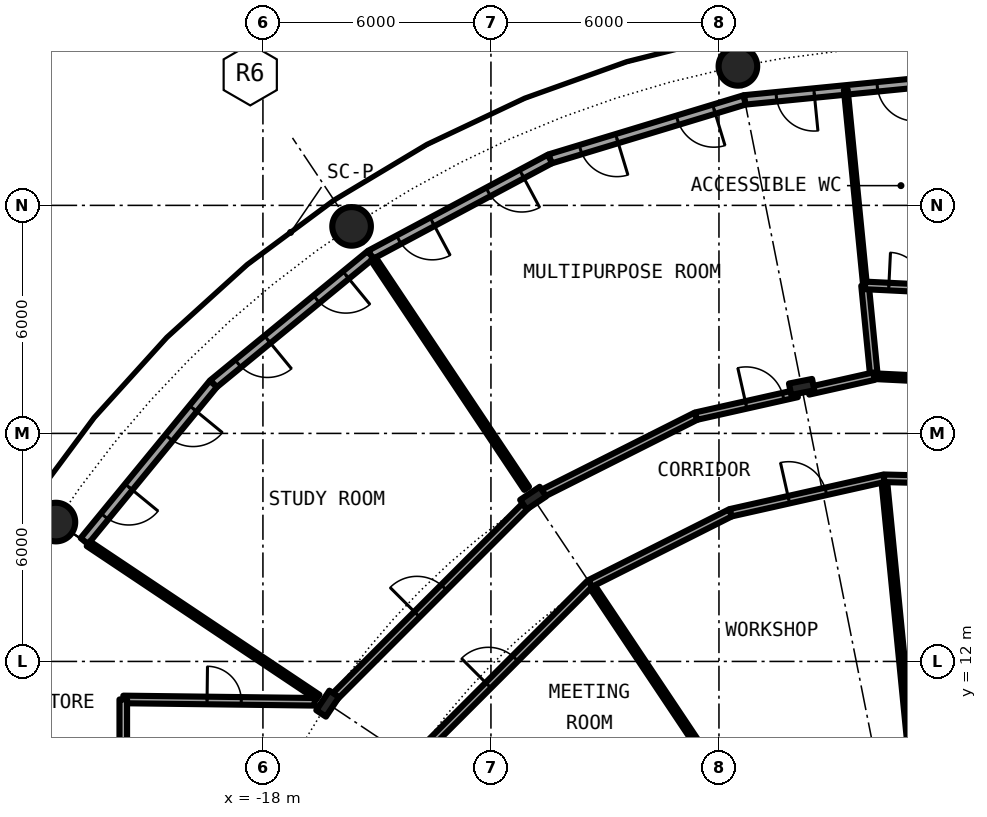
"""IFC4 building model, lengths in metres.
Left out: names, types, materials, properties, quantities, classifications, styles, units other than length and angle.
Written with IfcOpenShell. Run it as: python <this file> out.ifc"""

import sys

from ifc_helpers import new_model, si_unit, direction, frame, frame_2d, origin, origin_2d, place, context, subcontext, project, spatial, rectangle, hollow_circle, i_section, extrude, element, fill, save


model = new_model("IFC4")
c1 = context("Model", 3, precision=1e-05, world=origin(), true_north=direction((0.0, 1.0)))
c2 = subcontext(c1, "Body", "Model", "MODEL_VIEW")
j1 = project(units=[si_unit("LENGTHUNIT", "METRE"), si_unit("PLANEANGLEUNIT", "RADIAN")], contexts=[c1])
p1 = place(None, origin())
s1 = spatial("IfcSite", under=j1, at=p1, CompositionType="ELEMENT")
p2 = place(p1, origin())
s2 = spatial("IfcBuilding", under=s1, at=p2, CompositionType="ELEMENT")
p3 = place(p2, frame((0.0, 0.0, 53.3)))
s3 = spatial("IfcBuildingStorey", under=s2, at=p3, CompositionType="ELEMENT", Elevation=53.3)
for number, where, z_axis, x_axis in (
    (1, (-5.501, 27.658, 0.0), (0.0, 0.0, 1.0), (1.0, 0.0, 0.0)),
    (2, (-15.667, 23.448, 0.0), (0.0, 0.0, 1.0), (1.0, 0.0, 0.0)),
    (3, (-23.448, 15.667, 0.0), (0.0, 0.0, 1.0), (1.0, 0.0, 0.0)),
):
    element("IfcColumn", number, at=place(p3, frame(where, z_axis=z_axis, x_axis=x_axis)), inside=s3, PredefinedType="COLUMN", context=c2, shape_type="SweptSolid", body=[
        extrude(hollow_circle(Radius=0.508, WallThickness=0.05, at=origin_2d()), origin(), (0.0, 0.0, 1.0), 4.2),
    ])
for number, where, z_axis, x_axis in (
    (4, (-3.824, 19.223, 0.0), (0.0, 0.0, 1.0), (-0.195, 0.981, 0.0)),
    (5, (-10.889, 16.297, 0.0), (0.0, 0.0, 1.0), (-0.556, 0.831, 0.0)),
    (6, (-16.297, 10.889, 0.0), (0.0, 0.0, 1.0), (-0.831, 0.556, 0.0)),
):
    element("IfcColumn", number, at=place(p3, frame(where, z_axis=z_axis, x_axis=x_axis)), inside=s3, PredefinedType="COLUMN", context=c2, shape_type="SweptSolid", body=[
        extrude(i_section(OverallWidth=0.305, OverallDepth=0.62, WebThickness=0.021, FlangeThickness=0.04, FilletRadius=0.027, at=origin_2d()), origin(), (0.0, 0.0, 1.0), 4.2),
    ])
p4 = place(p3, frame((0.0, 27.3, 0.0), z_axis=(0.0, 0.0, 1.0), x_axis=(-0.995173996315, -0.098126026407, 0.0)))
e7 = element("IfcWall", 7, at=p4, inside=s3, PredefinedType="SOLIDWALL", context=c2, shape_type="SweptSolid", body=[
    extrude(rectangle(XDim=5.352, YDim=0.25, at=frame_2d((2.676, 0.0))), origin(), (0.0, 0.0, 1.0), 3.8),
])
p5 = place(p4, frame((0.841, 0.0, 0.0)))
e8 = element("IfcOpeningElement", 8, at=p5, cuts=e7, PredefinedType="OPENING", context=c2, shape_type="SweptSolid", body=[
    extrude(rectangle(XDim=1.0, YDim=2.2, at=frame_2d((0.5, 1.1))), frame((0.0, 0.135, 0.0), z_axis=(0.0, -1.0, 0.0), x_axis=(1.0, 0.0, 0.0)), (0.0, 0.0, 1.0), 0.27),
])
p6 = place(p4, frame((3.51, 0.0, 0.0)))
e9 = element("IfcOpeningElement", 9, at=p6, cuts=e7, PredefinedType="OPENING", context=c2, shape_type="SweptSolid", body=[
    extrude(rectangle(XDim=1.0, YDim=2.2, at=frame_2d((0.5, 1.1))), frame((0.0, 0.135, 0.0), z_axis=(0.0, -1.0, 0.0), x_axis=(1.0, 0.0, 0.0)), (0.0, 0.0, 1.0), 0.27),
])
p7 = place(p3, frame((-5.326, 26.775, 0.0), z_axis=(0.0, 0.0, 1.0), x_axis=(-0.956965678721, -0.290201119486, 0.0)))
e10 = element("IfcWall", 10, at=p7, inside=s3, PredefinedType="SOLIDWALL", context=c2, shape_type="SweptSolid", body=[
    extrude(rectangle(XDim=5.351, YDim=0.25, at=frame_2d((2.676, 0.0))), origin(), (0.0, 0.0, 1.0), 3.8),
])
p8 = place(p7, frame((0.841, 0.0, 0.0)))
e11 = element("IfcOpeningElement", 11, at=p8, cuts=e10, PredefinedType="OPENING", context=c2, shape_type="SweptSolid", body=[
    extrude(rectangle(XDim=1.0, YDim=2.2, at=frame_2d((0.5, 1.1))), frame((0.0, 0.135, 0.0), z_axis=(0.0, -1.0, 0.0), x_axis=(1.0, 0.0, 0.0)), (0.0, 0.0, 1.0), 0.27),
])
p9 = place(p7, frame((3.51, 0.0, 0.0)))
e12 = element("IfcOpeningElement", 12, at=p9, cuts=e10, PredefinedType="OPENING", context=c2, shape_type="SweptSolid", body=[
    extrude(rectangle(XDim=1.0, YDim=2.2, at=frame_2d((0.5, 1.1))), frame((0.0, 0.135, 0.0), z_axis=(0.0, -1.0, 0.0), x_axis=(1.0, 0.0, 0.0)), (0.0, 0.0, 1.0), 0.27),
])
p10 = place(p3, frame((-10.447, 25.222, 0.0), z_axis=(0.0, 0.0, 1.0), x_axis=(-0.881915646801, -0.471407246368, 0.0)))
e13 = element("IfcWall", 13, at=p10, inside=s3, PredefinedType="SOLIDWALL", context=c2, shape_type="SweptSolid", body=[
    extrude(rectangle(XDim=5.352, YDim=0.25, at=frame_2d((2.676, 0.0))), origin(), (0.0, 0.0, 1.0), 3.8),
])
p11 = place(p10, frame((0.841, 0.0, 0.0)))
e14 = element("IfcOpeningElement", 14, at=p11, cuts=e13, PredefinedType="OPENING", context=c2, shape_type="SweptSolid", body=[
    extrude(rectangle(XDim=1.0, YDim=2.2, at=frame_2d((0.5, 1.1))), frame((0.0, 0.135, 0.0), z_axis=(0.0, -1.0, 0.0), x_axis=(1.0, 0.0, 0.0)), (0.0, 0.0, 1.0), 0.27),
])
p12 = place(p10, frame((3.51, 0.0, 0.0)))
e15 = element("IfcOpeningElement", 15, at=p12, cuts=e13, PredefinedType="OPENING", context=c2, shape_type="SweptSolid", body=[
    extrude(rectangle(XDim=1.0, YDim=2.2, at=frame_2d((0.5, 1.1))), frame((0.0, 0.135, 0.0), z_axis=(0.0, -1.0, 0.0), x_axis=(1.0, 0.0, 0.0)), (0.0, 0.0, 1.0), 0.27),
])
p13 = place(p3, frame((-15.167, 22.699, 0.0), z_axis=(0.0, 0.0, 1.0), x_axis=(-0.773019449054, -0.634382322723, 0.0)))
e16 = element("IfcWall", 16, at=p13, inside=s3, PredefinedType="SOLIDWALL", context=c2, shape_type="SweptSolid", body=[
    extrude(rectangle(XDim=5.352, YDim=0.25, at=frame_2d((2.676, 0.0))), origin(), (0.0, 0.0, 1.0), 3.8),
])
p14 = place(p13, frame((0.841, 0.0, 0.0)))
e17 = element("IfcOpeningElement", 17, at=p14, cuts=e16, PredefinedType="OPENING", context=c2, shape_type="SweptSolid", body=[
    extrude(rectangle(XDim=1.0, YDim=2.2, at=frame_2d((0.5, 1.1))), frame((0.0, 0.135, 0.0), z_axis=(0.0, -1.0, 0.0), x_axis=(1.0, 0.0, 0.0)), (0.0, 0.0, 1.0), 0.27),
])
p15 = place(p13, frame((3.51, 0.0, 0.0)))
e18 = element("IfcOpeningElement", 18, at=p15, cuts=e16, PredefinedType="OPENING", context=c2, shape_type="SweptSolid", body=[
    extrude(rectangle(XDim=1.0, YDim=2.2, at=frame_2d((0.5, 1.1))), frame((0.0, 0.135, 0.0), z_axis=(0.0, -1.0, 0.0), x_axis=(1.0, 0.0, 0.0)), (0.0, 0.0, 1.0), 0.27),
])
p16 = place(p3, frame((-19.304, 19.304, 0.0), z_axis=(0.0, 0.0, 1.0), x_axis=(-0.634382322723, -0.773019449054, 0.0)))
e19 = element("IfcWall", 19, at=p16, inside=s3, PredefinedType="SOLIDWALL", context=c2, shape_type="SweptSolid", body=[
    extrude(rectangle(XDim=5.352, YDim=0.25, at=frame_2d((2.676, 0.0))), origin(), (0.0, 0.0, 1.0), 3.8),
])
p17 = place(p16, frame((0.841, 0.0, 0.0)))
e20 = element("IfcOpeningElement", 20, at=p17, cuts=e19, PredefinedType="OPENING", context=c2, shape_type="SweptSolid", body=[
    extrude(rectangle(XDim=1.0, YDim=2.2, at=frame_2d((0.5, 1.1))), frame((0.0, 0.135, 0.0), z_axis=(0.0, -1.0, 0.0), x_axis=(1.0, 0.0, 0.0)), (0.0, 0.0, 1.0), 0.27),
])
p18 = place(p16, frame((3.51, 0.0, 0.0)))
e21 = element("IfcOpeningElement", 21, at=p18, cuts=e19, PredefinedType="OPENING", context=c2, shape_type="SweptSolid", body=[
    extrude(rectangle(XDim=1.0, YDim=2.2, at=frame_2d((0.5, 1.1))), frame((0.0, 0.135, 0.0), z_axis=(0.0, -1.0, 0.0), x_axis=(1.0, 0.0, 0.0)), (0.0, 0.0, 1.0), 0.27),
])
p19 = place(p3, frame((-22.595, 15.098, 0.0), z_axis=(0.0, 0.0, 1.0), x_axis=(0.831403467378, -0.55566921314, 0.0)))
e22 = element("IfcWall", 22, at=p19, inside=s3, PredefinedType="PARTITIONING", context=c2, shape_type="SweptSolid", body=[
    extrude(rectangle(XDim=7.265, YDim=0.15, at=frame_2d((3.632, 0.0))), origin(), (0.0, 0.0, 1.0), 3.8),
])
p20 = place(p3, frame((-15.097, 22.595, 0.0), z_axis=(0.0, 0.0, 1.0), x_axis=(0.555576285599, -0.831465568067, 0.0)))
e23 = element("IfcWall", 23, at=p20, inside=s3, PredefinedType="PARTITIONING", context=c2, shape_type="SweptSolid", body=[
    extrude(rectangle(XDim=7.264, YDim=0.15, at=frame_2d((3.632, 0.0))), origin(), (0.0, 0.0, 1.0), 3.8),
])
p21 = place(p3, frame((-9.389, 14.052, 0.0), z_axis=(0.0, 0.0, 1.0), x_axis=(0.555540720778, -0.831489330994, 0.0)))
e24 = element("IfcWall", 24, at=p21, inside=s3, PredefinedType="PARTITIONING", context=c2, shape_type="SweptSolid", body=[
    extrude(rectangle(XDim=9.18, YDim=0.15, at=frame_2d((4.59, 0.0))), origin(), (0.0, 0.0, 1.0), 3.8),
])
p22 = place(p3, frame((-2.663, 27.044, 0.0), z_axis=(0.0, 0.0, 1.0), x_axis=(0.097990148768, -0.995187384739, 0.0)))
e25 = element("IfcWall", 25, at=p22, inside=s3, PredefinedType="PARTITIONING", context=c2, shape_type="SweptSolid", body=[
    extrude(rectangle(XDim=5.175, YDim=0.1, at=frame_2d((2.587, 0.0))), origin(), (0.0, 0.0, 1.0), 3.8),
])
p23 = place(p3, frame((-2.156, 21.894, 0.0), z_axis=(0.0, 0.0, 1.0), x_axis=(0.097982433599, -0.995188144376, 0.0)))
e26 = element("IfcWall", 26, at=p23, inside=s3, PredefinedType="PARTITIONING", context=c2, shape_type="SweptSolid", body=[
    extrude(rectangle(XDim=2.399, YDim=0.2, at=frame_2d((1.2, 0.0))), origin(), (0.0, 0.0, 1.0), 3.8),
])
p24 = place(p3, frame((-1.657, 16.819, 0.0), z_axis=(0.0, 0.0, 1.0), x_axis=(0.097921086551, -0.995194182463, 0.0)))
e27 = element("IfcWall", 27, at=p24, inside=s3, PredefinedType="PARTITIONING", context=c2, shape_type="SweptSolid", body=[
    extrude(rectangle(XDim=9.18, YDim=0.15, at=frame_2d((4.59, 0.0))), origin(), (0.0, 0.0, 1.0), 3.8),
])
p25 = place(p3, frame((-21.675, 11.0, 0.0), z_axis=(0.0, 0.0, 1.0), x_axis=(0.99992425795, -0.012307654658, 0.0)))
e28 = element("IfcWall", 28, at=p25, inside=s3, PredefinedType="PARTITIONING", context=c2, shape_type="SweptSolid", body=[
    extrude(rectangle(XDim=5.039, YDim=0.2, at=frame_2d((2.519, 0.0))), origin(), (0.0, 0.0, 1.0), 3.8),
])
p26 = place(p25, frame((2.205, 0.0, 0.0)))
e29 = element("IfcOpeningElement", 29, at=p26, cuts=e28, PredefinedType="OPENING", context=c2, shape_type="SweptSolid", body=[
    extrude(rectangle(XDim=0.9, YDim=2.3, at=frame_2d((0.45, 1.15))), frame((0.0, 0.11, 0.0), z_axis=(0.0, -1.0, 0.0), x_axis=(1.0, 0.0, 0.0)), (0.0, 0.0, 1.0), 0.22),
])
p27 = place(p3, frame((-14.041, 9.4, 0.0), z_axis=(0.0, 0.0, 1.0), x_axis=(0.707106781187, 0.707106781187, 0.0)))
e30 = element("IfcWall", 30, at=p27, inside=s3, PredefinedType="PARTITIONING", context=c2, shape_type="SweptSolid", body=[
    extrude(rectangle(XDim=6.579, YDim=0.2, at=frame_2d((3.29, 0.0))), origin(), (0.0, 0.0, 1.0), 3.8),
])
p28 = place(p27, frame((2.789, 0.0, 0.0)))
e31 = element("IfcOpeningElement", 31, at=p28, cuts=e30, PredefinedType="OPENING", context=c2, shape_type="SweptSolid", body=[
    extrude(rectangle(XDim=1.0, YDim=2.3, at=frame_2d((0.5, 1.15))), frame((0.0, 0.11, 0.0), z_axis=(0.0, -1.0, 0.0), x_axis=(1.0, 0.0, 0.0)), (0.0, 0.0, 1.0), 0.22),
])
p29 = place(p3, frame((-9.389, 14.052, 0.0), z_axis=(0.0, 0.0, 1.0), x_axis=(0.893243942099, 0.449572307759, 0.0)))
e32 = element("IfcWall", 32, at=p29, inside=s3, PredefinedType="PARTITIONING", context=c2, shape_type="SweptSolid", body=[
    extrude(rectangle(XDim=4.137, YDim=0.2, at=frame_2d((2.069, 0.0))), origin(), (0.0, 0.0, 1.0), 3.8),
])
p30 = place(p3, frame((-5.693, 15.912, 0.0), z_axis=(0.0, 0.0, 1.0), x_axis=(0.975680467384, 0.219197686039, 0.0)))
e33 = element("IfcWall", 33, at=p30, inside=s3, PredefinedType="PARTITIONING", context=c2, shape_type="SweptSolid", body=[
    extrude(rectangle(XDim=4.138, YDim=0.2, at=frame_2d((2.069, 0.0))), origin(), (0.0, 0.0, 1.0), 3.8),
])
p31 = place(p30, frame((1.569, 0.0, 0.0)))
e34 = element("IfcOpeningElement", 34, at=p31, cuts=e33, PredefinedType="OPENING", context=c2, shape_type="SweptSolid", body=[
    extrude(rectangle(XDim=1.0, YDim=2.3, at=frame_2d((0.5, 1.15))), frame((0.0, 0.11, 0.0), z_axis=(0.0, -1.0, 0.0), x_axis=(1.0, 0.0, 0.0)), (0.0, 0.0, 1.0), 0.22),
])
p32 = place(p3, frame((-1.656, 16.819, 0.0), z_axis=(0.0, 0.0, 1.0), x_axis=(0.999695739034, -0.024666360836, 0.0)))
e35 = element("IfcWall", 35, at=p32, inside=s3, PredefinedType="PARTITIONING", context=c2, shape_type="SweptSolid", body=[
    extrude(rectangle(XDim=4.137, YDim=0.2, at=frame_2d((2.069, 0.0))), origin(), (0.0, 0.0, 1.0), 3.8),
])
p33 = place(p32, frame((1.569, 0.0, 0.0)))
e36 = element("IfcOpeningElement", 36, at=p33, cuts=e35, PredefinedType="OPENING", context=c2, shape_type="SweptSolid", body=[
    extrude(rectangle(XDim=1.0, YDim=2.3, at=frame_2d((0.5, 1.15))), frame((0.0, 0.11, 0.0), z_axis=(0.0, -1.0, 0.0), x_axis=(1.0, 0.0, 0.0)), (0.0, 0.0, 1.0), 0.22),
])
p34 = place(p3, frame((-16.187, 10.999, 0.0), z_axis=(0.0, 0.0, 1.0), x_axis=(0.707106781187, 0.707106781187, 0.0)))
e37 = element("IfcWall", 37, at=p34, inside=s3, PredefinedType="PARTITIONING", context=c2, shape_type="SweptSolid", body=[
    extrude(rectangle(XDim=7.337, YDim=0.2, at=frame_2d((3.668, 0.0))), origin(), (0.0, 0.0, 1.0), 3.48),
])
p35 = place(p34, frame((3.168, 0.0, 0.0)))
e38 = element("IfcOpeningElement", 38, at=p35, cuts=e37, PredefinedType="OPENING", context=c2, shape_type="SweptSolid", body=[
    extrude(rectangle(XDim=1.0, YDim=2.3, at=frame_2d((0.5, 1.15))), frame((0.0, 0.11, 0.0), z_axis=(0.0, -1.0, 0.0), x_axis=(1.0, 0.0, 0.0)), (0.0, 0.0, 1.0), 0.22),
])
p36 = place(p3, frame((-1.921, 19.506, 0.0), z_axis=(0.0, 0.0, 1.0), x_axis=(0.99879118777, -0.049154483346, 0.0)))
e39 = element("IfcWall", 39, at=p36, inside=s3, PredefinedType="PARTITIONING", context=c2, shape_type="SweptSolid", body=[
    extrude(rectangle(XDim=5.598, YDim=0.15, at=frame_2d((2.799, 0.0))), origin(), (0.0, 0.0, 1.0), 3.48),
])
p37 = place(p36, frame((2.376, 0.0, 0.0)))
e40 = element("IfcOpeningElement", 40, at=p37, cuts=e39, PredefinedType="OPENING", context=c2, shape_type="SweptSolid", body=[
    extrude(rectangle(XDim=1.0, YDim=2.3, at=frame_2d((0.5, 1.15))), frame((0.0, 0.085, 0.0), z_axis=(0.0, -1.0, 0.0), x_axis=(1.0, 0.0, 0.0)), (0.0, 0.0, 1.0), 0.17),
])
p38 = place(p3, frame((-10.752, 16.366, 0.0), z_axis=(0.0, 0.0, 1.0), x_axis=(0.893246691773, 0.449566844459, 0.0)))
e41 = element("IfcWall", 41, at=p38, inside=s3, PredefinedType="PARTITIONING", context=c2, shape_type="SweptSolid", body=[
    extrude(rectangle(XDim=4.645, YDim=0.2, at=frame_2d((2.322, 0.0))), origin(), (0.0, 0.0, 1.0), 3.48),
])
p39 = place(p3, frame((-6.603, 18.454, 0.0), z_axis=(0.0, 0.0, 1.0), x_axis=(0.975697485794, 0.219121920893, 0.0)))
e42 = element("IfcWall", 42, at=p39, inside=s3, PredefinedType="PARTITIONING", context=c2, shape_type="SweptSolid", body=[
    extrude(rectangle(XDim=2.724, YDim=0.2, at=frame_2d((1.362, 0.0))), origin(), (0.0, 0.0, 1.0), 3.48),
])
p40 = place(p39, frame((1.35, 0.0, 0.0)))
e43 = element("IfcOpeningElement", 43, at=p40, cuts=e42, PredefinedType="OPENING", context=c2, shape_type="SweptSolid", body=[
    extrude(rectangle(XDim=1.0, YDim=2.3, at=frame_2d((0.5, 1.15))), frame((0.0, 0.11, 0.0), z_axis=(0.0, -1.0, 0.0), x_axis=(1.0, 0.0, 0.0)), (0.0, 0.0, 1.0), 0.22),
])
p41 = place(p3, frame((-3.647, 19.118, 0.0), z_axis=(0.0, 0.0, 1.0), x_axis=(0.975631915864, 0.219413684049, 0.0)))
e44 = element("IfcWall", 44, at=p41, inside=s3, PredefinedType="PARTITIONING", context=c2, shape_type="SweptSolid", body=[
    extrude(rectangle(XDim=1.769, YDim=0.2, at=frame_2d((0.885, 0.0))), origin(), (0.0, 0.0, 1.0), 3.48),
])
p42 = place(p3, frame((-21.675, 9.4, 0.0), z_axis=(0.0, 0.0, 1.0), x_axis=(0.0, 1.0, 0.0)))
e45 = element("IfcWall", 45, at=p42, inside=s3, PredefinedType="PARTITIONING", context=c2, shape_type="SweptSolid", body=[
    extrude(rectangle(XDim=1.6, YDim=0.2, at=frame_2d((0.8, 0.0))), origin(), (0.0, 0.0, 1.0), 3.8),
])
p43 = place(p3, frame((-2.156, 21.894, 0.0), z_axis=(0.0, 0.0, 1.0), x_axis=(0.998785221138, -0.049275572418, 0.0)))
e46 = element("IfcWall", 46, at=p43, inside=s3, PredefinedType="PARTITIONING", context=c2, shape_type="SweptSolid", body=[
    extrude(rectangle(XDim=6.456, YDim=0.2, at=frame_2d((3.228, 0.0))), origin(), (0.0, 0.0, 1.0), 3.8),
])
p44 = place(p43, frame((4.93, 0.0, 0.0)))
e47 = element("IfcOpeningElement", 47, at=p44, cuts=e46, PredefinedType="OPENING", context=c2, shape_type="SweptSolid", body=[
    extrude(rectangle(XDim=0.9, YDim=2.3, at=frame_2d((0.45, 1.15))), frame((0.0, 0.11, 0.0), z_axis=(0.0, -1.0, 0.0), x_axis=(1.0, 0.0, 0.0)), (0.0, 0.0, 1.0), 0.22),
])
p45 = place(p43, frame((2.788, 0.0, 0.0)))
e48 = element("IfcOpeningElement", 48, at=p45, cuts=e46, PredefinedType="OPENING", context=c2, shape_type="SweptSolid", body=[
    extrude(rectangle(XDim=0.9, YDim=2.3, at=frame_2d((0.45, 1.15))), frame((0.0, 0.11, 0.0), z_axis=(0.0, -1.0, 0.0), x_axis=(1.0, 0.0, 0.0)), (0.0, 0.0, 1.0), 0.22),
])
p46 = place(p43, frame((0.626, 0.0, 0.0)))
e49 = element("IfcOpeningElement", 49, at=p46, cuts=e46, PredefinedType="OPENING", context=c2, shape_type="SweptSolid", body=[
    extrude(rectangle(XDim=0.9, YDim=2.3, at=frame_2d((0.45, 1.15))), frame((0.0, 0.11, 0.0), z_axis=(0.0, -1.0, 0.0), x_axis=(1.0, 0.0, 0.0)), (0.0, 0.0, 1.0), 0.22),
])
p47 = place(p5, origin())
e50 = element("IfcDoor", 50, at=p47, inside=s3, OperationType="SINGLE_SWING_LEFT", PredefinedType="DOOR", context=c2, shape_type="SweptSolid", body=[
    extrude(rectangle(XDim=1.0, YDim=2.2, at=frame_2d((0.5, 1.1))), frame((0.0, 0.025, 0.0), z_axis=(0.0, -1.0, 0.0), x_axis=(1.0, 0.0, 0.0)), (0.0, 0.0, 1.0), 0.05),
])
fill(e8, e50)
p48 = place(p6, origin())
e51 = element("IfcDoor", 51, at=p48, inside=s3, OperationType="SINGLE_SWING_LEFT", PredefinedType="DOOR", context=c2, shape_type="SweptSolid", body=[
    extrude(rectangle(XDim=1.0, YDim=2.2, at=frame_2d((0.5, 1.1))), frame((0.0, 0.025, 0.0), z_axis=(0.0, -1.0, 0.0), x_axis=(1.0, 0.0, 0.0)), (0.0, 0.0, 1.0), 0.05),
])
fill(e9, e51)
p49 = place(p8, origin())
e52 = element("IfcDoor", 52, at=p49, inside=s3, OperationType="SINGLE_SWING_LEFT", PredefinedType="DOOR", context=c2, shape_type="SweptSolid", body=[
    extrude(rectangle(XDim=1.0, YDim=2.2, at=frame_2d((0.5, 1.1))), frame((0.0, 0.025, 0.0), z_axis=(0.0, -1.0, 0.0), x_axis=(1.0, 0.0, 0.0)), (0.0, 0.0, 1.0), 0.05),
])
fill(e11, e52)
p50 = place(p9, origin())
e53 = element("IfcDoor", 53, at=p50, inside=s3, OperationType="SINGLE_SWING_LEFT", PredefinedType="DOOR", context=c2, shape_type="SweptSolid", body=[
    extrude(rectangle(XDim=1.0, YDim=2.2, at=frame_2d((0.5, 1.1))), frame((0.0, 0.025, 0.0), z_axis=(0.0, -1.0, 0.0), x_axis=(1.0, 0.0, 0.0)), (0.0, 0.0, 1.0), 0.05),
])
fill(e12, e53)
p51 = place(p11, origin())
e54 = element("IfcDoor", 54, at=p51, inside=s3, OperationType="SINGLE_SWING_LEFT", PredefinedType="DOOR", context=c2, shape_type="SweptSolid", body=[
    extrude(rectangle(XDim=1.0, YDim=2.2, at=frame_2d((0.5, 1.1))), frame((0.0, 0.025, 0.0), z_axis=(0.0, -1.0, 0.0), x_axis=(1.0, 0.0, 0.0)), (0.0, 0.0, 1.0), 0.05),
])
fill(e14, e54)
p52 = place(p12, origin())
e55 = element("IfcDoor", 55, at=p52, inside=s3, OperationType="SINGLE_SWING_LEFT", PredefinedType="DOOR", context=c2, shape_type="SweptSolid", body=[
    extrude(rectangle(XDim=1.0, YDim=2.2, at=frame_2d((0.5, 1.1))), frame((0.0, 0.025, 0.0), z_axis=(0.0, -1.0, 0.0), x_axis=(1.0, 0.0, 0.0)), (0.0, 0.0, 1.0), 0.05),
])
fill(e15, e55)
p53 = place(p14, origin())
e56 = element("IfcDoor", 56, at=p53, inside=s3, OperationType="SINGLE_SWING_LEFT", PredefinedType="DOOR", context=c2, shape_type="SweptSolid", body=[
    extrude(rectangle(XDim=1.0, YDim=2.2, at=frame_2d((0.5, 1.1))), frame((0.0, 0.025, 0.0), z_axis=(0.0, -1.0, 0.0), x_axis=(1.0, 0.0, 0.0)), (0.0, 0.0, 1.0), 0.05),
])
fill(e17, e56)
p54 = place(p15, origin())
e57 = element("IfcDoor", 57, at=p54, inside=s3, OperationType="SINGLE_SWING_LEFT", PredefinedType="DOOR", context=c2, shape_type="SweptSolid", body=[
    extrude(rectangle(XDim=1.0, YDim=2.2, at=frame_2d((0.5, 1.1))), frame((0.0, 0.025, 0.0), z_axis=(0.0, -1.0, 0.0), x_axis=(1.0, 0.0, 0.0)), (0.0, 0.0, 1.0), 0.05),
])
fill(e18, e57)
p55 = place(p17, origin())
e58 = element("IfcDoor", 58, at=p55, inside=s3, OperationType="SINGLE_SWING_LEFT", PredefinedType="DOOR", context=c2, shape_type="SweptSolid", body=[
    extrude(rectangle(XDim=1.0, YDim=2.2, at=frame_2d((0.5, 1.1))), frame((0.0, 0.025, 0.0), z_axis=(0.0, -1.0, 0.0), x_axis=(1.0, 0.0, 0.0)), (0.0, 0.0, 1.0), 0.05),
])
fill(e20, e58)
p56 = place(p18, origin())
e59 = element("IfcDoor", 59, at=p56, inside=s3, OperationType="SINGLE_SWING_LEFT", PredefinedType="DOOR", context=c2, shape_type="SweptSolid", body=[
    extrude(rectangle(XDim=1.0, YDim=2.2, at=frame_2d((0.5, 1.1))), frame((0.0, 0.025, 0.0), z_axis=(0.0, -1.0, 0.0), x_axis=(1.0, 0.0, 0.0)), (0.0, 0.0, 1.0), 0.05),
])
fill(e21, e59)
p57 = place(p46, origin())
e60 = element("IfcDoor", 60, at=p57, inside=s3, OperationType="SINGLE_SWING_LEFT", PredefinedType="DOOR", context=c2, shape_type="SweptSolid", body=[
    extrude(rectangle(XDim=0.9, YDim=2.3, at=frame_2d((0.45, 1.15))), frame((0.0, 0.025, 0.0), z_axis=(0.0, -1.0, 0.0), x_axis=(1.0, 0.0, 0.0)), (0.0, 0.0, 1.0), 0.05),
])
fill(e49, e60)
p58 = place(p40, origin())
e61 = element("IfcDoor", 61, at=p58, inside=s3, OperationType="SINGLE_SWING_RIGHT", PredefinedType="DOOR", context=c2, shape_type="SweptSolid", body=[
    extrude(rectangle(XDim=1.0, YDim=2.3, at=frame_2d((0.5, 1.15))), frame((0.0, 0.025, 0.0), z_axis=(0.0, -1.0, 0.0), x_axis=(1.0, 0.0, 0.0)), (0.0, 0.0, 1.0), 0.05),
])
fill(e43, e61)
p59 = place(p35, origin())
e62 = element("IfcDoor", 62, at=p59, inside=s3, OperationType="SINGLE_SWING_RIGHT", PredefinedType="DOOR", context=c2, shape_type="SweptSolid", body=[
    extrude(rectangle(XDim=1.0, YDim=2.3, at=frame_2d((0.5, 1.15))), frame((0.0, 0.025, 0.0), z_axis=(0.0, -1.0, 0.0), x_axis=(1.0, 0.0, 0.0)), (0.0, 0.0, 1.0), 0.05),
])
fill(e38, e62)
p60 = place(p31, origin())
e63 = element("IfcDoor", 63, at=p60, inside=s3, OperationType="SINGLE_SWING_RIGHT", PredefinedType="DOOR", context=c2, shape_type="SweptSolid", body=[
    extrude(rectangle(XDim=1.0, YDim=2.3, at=frame_2d((0.5, 1.15))), frame((0.0, 0.025, 0.0), z_axis=(0.0, -1.0, 0.0), x_axis=(1.0, 0.0, 0.0)), (0.0, 0.0, 1.0), 0.05),
])
fill(e34, e63)
p61 = place(p28, origin())
e64 = element("IfcDoor", 64, at=p61, inside=s3, OperationType="SINGLE_SWING_RIGHT", PredefinedType="DOOR", context=c2, shape_type="SweptSolid", body=[
    extrude(rectangle(XDim=1.0, YDim=2.3, at=frame_2d((0.5, 1.15))), frame((0.0, 0.025, 0.0), z_axis=(0.0, -1.0, 0.0), x_axis=(1.0, 0.0, 0.0)), (0.0, 0.0, 1.0), 0.05),
])
fill(e31, e64)
p62 = place(p26, origin())
e65 = element("IfcDoor", 65, at=p62, inside=s3, OperationType="SINGLE_SWING_RIGHT", PredefinedType="DOOR", context=c2, shape_type="SweptSolid", body=[
    extrude(rectangle(XDim=0.9, YDim=2.3, at=frame_2d((0.45, 1.15))), frame((0.0, 0.025, 0.0), z_axis=(0.0, -1.0, 0.0), x_axis=(1.0, 0.0, 0.0)), (0.0, 0.0, 1.0), 0.05),
])
fill(e29, e65)
save(model, sys.argv[1])
